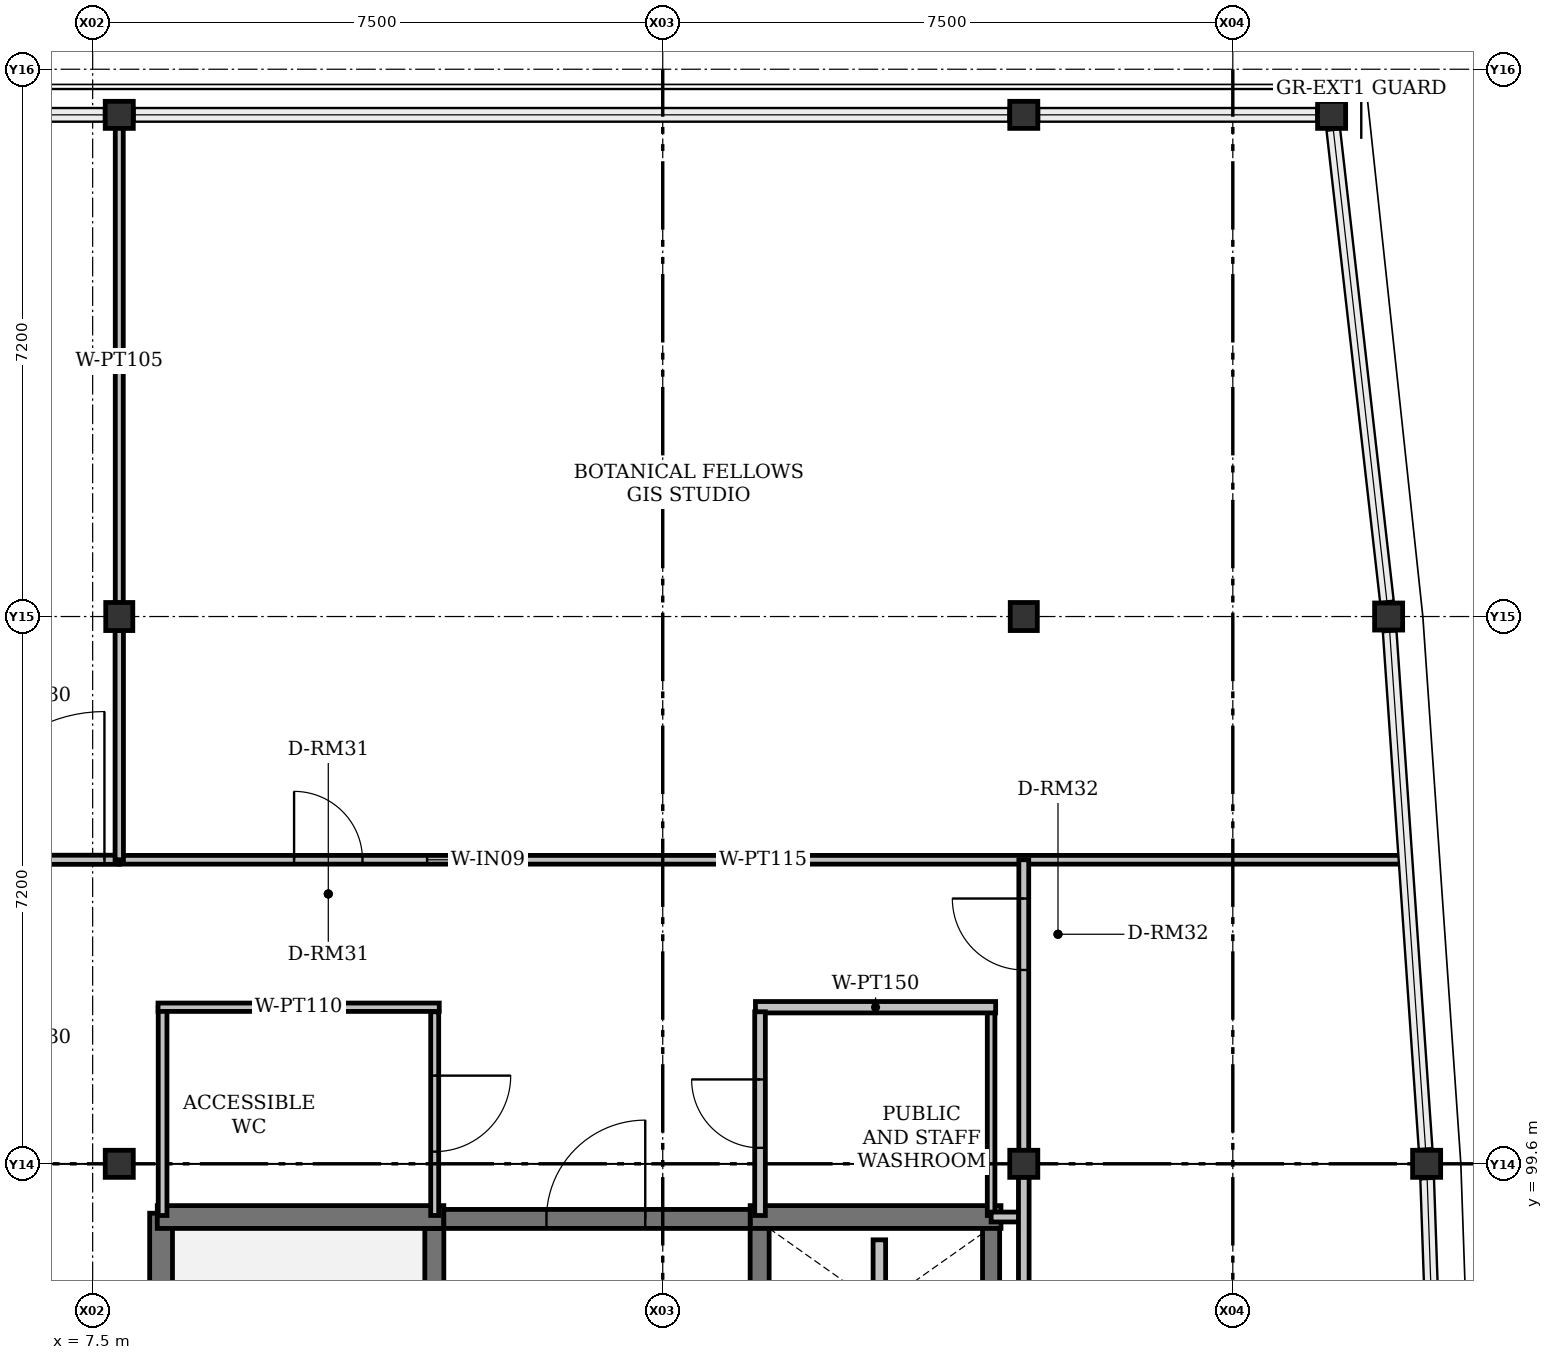
"""IFC4 building model, lengths in metres.
Left out: names, types, materials, properties, quantities, classifications, styles, units other than length and angle.
Written with IfcOpenShell. Run it as: python <this file> out.ifc"""

import sys

from ifc_helpers import new_model, si_unit, direction, frame, frame_2d, origin, origin_2d, place, context, subcontext, project, spatial, rectangle, i_section, extrude, element, fill, save


model = new_model("IFC4")
c1 = context("Model", 3, precision=1e-05, world=origin(), true_north=direction((0.0, 1.0)))
c2 = subcontext(c1, "Body", "Model", "MODEL_VIEW")
j1 = project(units=[si_unit("LENGTHUNIT", "METRE"), si_unit("PLANEANGLEUNIT", "RADIAN")], contexts=[c1])
p1 = place(None, origin())
s1 = spatial("IfcSite", under=j1, at=p1, CompositionType="ELEMENT")
p2 = place(p1, origin())
s2 = spatial("IfcBuilding", under=s1, at=p2, CompositionType="ELEMENT")
p3 = place(p2, frame((0.0, 0.0, 51.9)))
s3 = spatial("IfcBuildingStorey", under=s2, at=p3, CompositionType="ELEMENT", Elevation=51.9)
for number, where, z_axis, x_axis in (
    (1, (7.85, 99.6, 0.0), (0.0, 0.0, 1.0), (1.0, 0.0, 0.0)),
    (2, (19.75, 99.6, 0.0), (0.0, 0.0, 1.0), (1.0, 0.0, 0.0)),
    (3, (25.05, 99.6, 0.0), (0.0, 0.0, 1.0), (1.0, 0.0, 0.0)),
    (4, (7.85, 106.8, 0.0), (0.0, 0.0, 1.0), (0.0, 1.0, 0.0)),
    (5, (19.75, 106.8, 0.0), (0.0, 0.0, 1.0), (0.0, 1.0, 0.0)),
    (6, (24.55, 106.8, 0.0), (0.0, 0.0, 1.0), (1.0, 0.0, 0.0)),
    (7, (7.85, 113.4, 0.0), (0.0, 0.0, 1.0), (1.0, 0.0, 0.0)),
    (8, (19.75, 113.4, 0.0), (0.0, 0.0, 1.0), (1.0, 0.0, 0.0)),
    (9, (23.8, 113.4, 0.0), (0.0, 0.0, 1.0), (1.0, 0.0, 0.0)),
):
    element("IfcColumn", number, at=place(p3, frame(where, z_axis=z_axis, x_axis=x_axis)), inside=s3, PredefinedType="COLUMN", context=c2, shape_type="SweptSolid", body=[
        extrude(i_section(OverallWidth=0.369, OverallDepth=0.356, WebThickness=0.011, FlangeThickness=0.018, FilletRadius=0.015, at=origin_2d()), origin(), (0.0, 0.0, 1.0), 4.2),
    ])
p4 = place(p3, frame((8.4, 90.775, 0.0), z_axis=(0.0, 0.0, 1.0), x_axis=(0.0, 1.0, 0.0)))
e10 = element("IfcWall", 10, at=p4, inside=s3, PredefinedType="SHEAR", context=c2, shape_type="SweptSolid", body=[
    extrude(rectangle(XDim=8.175, YDim=0.3, at=frame_2d((4.087, 0.0))), origin(), (0.0, 0.0, 1.0), 4.2),
])
p5 = place(p3, frame((11.995, 90.9, 0.0), z_axis=(0.0, 0.0, 1.0), x_axis=(0.0, 1.0, 0.0)))
e11 = element("IfcWall", 11, at=p5, inside=s3, PredefinedType="SHEAR", context=c2, shape_type="SweptSolid", body=[
    extrude(rectangle(XDim=7.85, YDim=0.25, at=frame_2d((3.925, 0.0))), origin(), (0.0, 0.0, 1.0), 4.2),
])
p6 = place(p3, frame((8.35, 98.9, 0.0), z_axis=(0.0, 0.0, 1.0), x_axis=(1.0, 0.0, 0.0)))
e12 = element("IfcWall", 12, at=p6, inside=s3, PredefinedType="SHEAR", context=c2, shape_type="SweptSolid", body=[
    extrude(rectangle(XDim=3.77, YDim=0.3, at=frame_2d((1.885, 0.0))), origin(), (0.0, 0.0, 1.0), 4.2),
])
p7 = place(p3, frame((16.15, 98.9, 0.0), z_axis=(0.0, 0.0, 1.0), x_axis=(1.0, 0.0, 0.0)))
e13 = element("IfcWall", 13, at=p7, inside=s3, PredefinedType="SHEAR", context=c2, shape_type="SweptSolid", body=[
    extrude(rectangle(XDim=3.3, YDim=0.3, at=frame_2d((1.65, 0.0))), origin(), (0.0, 0.0, 1.0), 4.2),
])
p8 = place(p3, frame((12.12, 98.875, 0.0), z_axis=(0.0, 0.0, 1.0), x_axis=(1.0, 0.0, 0.0)))
e14 = element("IfcWall", 14, at=p8, inside=s3, PredefinedType="SHEAR", context=c2, shape_type="SweptSolid", body=[
    extrude(rectangle(XDim=4.03, YDim=0.25, at=frame_2d((2.015, 0.0))), origin(), (0.0, 0.0, 1.0), 4.2),
])
p9 = place(p8, frame((1.35, 0.0, 0.0)))
e15 = element("IfcOpeningElement", 15, at=p9, cuts=e14, PredefinedType="OPENING", context=c2, shape_type="SweptSolid", body=[
    extrude(rectangle(XDim=1.3, YDim=2.2, at=frame_2d((0.65, 1.1))), frame((0.0, 0.125, 0.0), z_axis=(0.0, -1.0, 0.0), x_axis=(1.0, 0.0, 0.0)), (0.0, 0.0, 1.0), 0.25),
])
p10 = place(p3, frame((19.32, 84.8, 0.0), z_axis=(0.0, 0.0, 1.0), x_axis=(0.0, 1.0, 0.0)))
e16 = element("IfcWall", 16, at=p10, inside=s3, PredefinedType="SHEAR", context=c2, shape_type="SweptSolid", body=[
    extrude(rectangle(XDim=13.95, YDim=0.225, at=frame_2d((6.975, 0.0))), origin(), (0.0, 0.0, 1.0), 4.2),
])
p11 = place(p3, frame((16.275, 96.575, 0.0), z_axis=(0.0, 0.0, 1.0), x_axis=(0.0, 1.0, 0.0)))
e17 = element("IfcWall", 17, at=p11, inside=s3, PredefinedType="SHEAR", context=c2, shape_type="SweptSolid", body=[
    extrude(rectangle(XDim=2.175, YDim=0.25, at=frame_2d((1.087, 0.0))), origin(), (0.0, 0.0, 1.0), 4.2),
])
p12 = place(p3, frame((17.85, 96.8, 0.0), z_axis=(0.0, 0.0, 1.0), x_axis=(0.0, 1.0, 0.0)))
e18 = element("IfcWall", 18, at=p12, inside=s3, PredefinedType="PLUMBINGWALL", context=c2, shape_type="SweptSolid", body=[
    extrude(rectangle(XDim=1.8, YDim=0.165, at=frame_2d((0.9, 0.0))), origin(), (0.0, 0.0, 1.0), 4.2),
])
p13 = place(p3, frame((8.42, 98.92, 0.0), z_axis=(0.0, 0.0, 1.0), x_axis=(0.0, 1.0, 0.0)))
e19 = element("IfcWall", 19, at=p13, inside=s3, PredefinedType="PARTITIONING", context=c2, shape_type="SweptSolid", body=[
    extrude(rectangle(XDim=2.74, YDim=0.115, at=frame_2d((1.37, 0.0))), origin(), (0.0, 0.0, 1.0), 3.451),
])
p14 = place(p3, frame((8.36, 101.66, 0.0), z_axis=(0.0, 0.0, 1.0), x_axis=(1.0, 0.0, 0.0)))
e20 = element("IfcWall", 20, at=p14, inside=s3, PredefinedType="PARTITIONING", context=c2, shape_type="SweptSolid", body=[
    extrude(rectangle(XDim=3.7, YDim=0.11, at=frame_2d((1.85, 0.0))), origin(), (0.0, 0.0, 1.0), 3.95),
])
p15 = place(p3, frame((12.0, 101.6, 0.0), z_axis=(0.0, 0.0, 1.0), x_axis=(0.0, -1.0, 0.0)))
e21 = element("IfcWall", 21, at=p15, inside=s3, PredefinedType="PARTITIONING", context=c2, shape_type="SweptSolid", body=[
    extrude(rectangle(XDim=2.68, YDim=0.105, at=frame_2d((1.34, 0.0))), origin(), (0.0, 0.0, 1.0), 3.451),
])
p16 = place(p15, frame((0.84, 0.0, 0.0)))
e22 = element("IfcOpeningElement", 22, at=p16, cuts=e21, PredefinedType="OPENING", context=c2, shape_type="SweptSolid", body=[
    extrude(rectangle(XDim=1.0, YDim=2.25, at=frame_2d((0.5, 1.125))), frame((0.0, 0.052, 0.0), z_axis=(0.0, -1.0, 0.0), x_axis=(1.0, 0.0, 0.0)), (0.0, 0.0, 1.0), 0.105),
])
p17 = place(p3, frame((19.32, 98.92, 0.0), z_axis=(0.0, 0.0, 1.0), x_axis=(0.0, 1.0, 0.0)))
e23 = element("IfcWall", 23, at=p17, inside=s3, PredefinedType="PARTITIONING", context=c2, shape_type="SweptSolid", body=[
    extrude(rectangle(XDim=2.74, YDim=0.1, at=frame_2d((1.37, 0.0))), origin(), (0.0, 0.0, 1.0), 3.451),
])
p18 = place(p3, frame((19.38, 101.66, 0.0), z_axis=(0.0, 0.0, 1.0), x_axis=(-1.0, 0.0, 0.0)))
e24 = element("IfcWall", 24, at=p18, inside=s3, PredefinedType="PARTITIONING", context=c2, shape_type="SweptSolid", body=[
    extrude(rectangle(XDim=3.16, YDim=0.15, at=frame_2d((1.58, 0.0))), origin(), (0.0, 0.0, 1.0), 3.95),
])
p19 = place(p3, frame((16.28, 98.92, 0.0), z_axis=(0.0, 0.0, 1.0), x_axis=(0.0, 1.0, 0.0)))
e25 = element("IfcWall", 25, at=p19, inside=s3, PredefinedType="PARTITIONING", context=c2, shape_type="SweptSolid", body=[
    extrude(rectangle(XDim=2.68, YDim=0.14, at=frame_2d((1.34, 0.0))), origin(), (0.0, 0.0, 1.0), 3.451),
])
p20 = place(p19, frame((0.89, 0.0, 0.0)))
e26 = element("IfcOpeningElement", 26, at=p20, cuts=e25, PredefinedType="OPENING", context=c2, shape_type="SweptSolid", body=[
    extrude(rectangle(XDim=0.9, YDim=2.08, at=frame_2d((0.45, 1.04))), frame((0.0, 0.07, 0.0), z_axis=(0.0, -1.0, 0.0), x_axis=(1.0, 0.0, 0.0)), (0.0, 0.0, 1.0), 0.14),
])
p21 = place(p3, frame((19.75, 98.9, 0.0), z_axis=(0.0, 0.0, 1.0), x_axis=(-1.0, 0.0, 0.0)))
e27 = element("IfcWall", 27, at=p21, inside=s3, PredefinedType="PARTITIONING", context=c2, shape_type="SweptSolid", body=[
    extrude(rectangle(XDim=0.43, YDim=0.13, at=frame_2d((0.215, 0.0))), origin(), (0.0, 0.0, 1.0), 3.527),
])
p22 = place(p3, frame((0.65, 103.6, 0.0), z_axis=(0.0, 0.0, 1.0), x_axis=(1.0, 0.0, 0.0)))
e28 = element("IfcWall", 28, at=p22, inside=s3, PredefinedType="PARTITIONING", context=c2, shape_type="SweptSolid", body=[
    extrude(rectangle(XDim=7.2, YDim=0.12, at=frame_2d((3.6, 0.0))), origin(), (0.0, 0.0, 1.0), 3.527),
])
p23 = place(p22, frame((5.055, 0.0, 0.0)))
e29 = element("IfcOpeningElement", 29, at=p23, cuts=e28, PredefinedType="OPENING", context=c2, shape_type="SweptSolid", body=[
    extrude(rectangle(XDim=1.95, YDim=2.4, at=frame_2d((0.975, 1.2))), frame((0.0, 0.06, 0.0), z_axis=(0.0, -1.0, 0.0), x_axis=(1.0, 0.0, 0.0)), (0.0, 0.0, 1.0), 0.12),
])
p24 = place(p3, frame((7.85, 103.6, 0.0), z_axis=(0.0, 0.0, 1.0), x_axis=(1.0, 0.0, 0.0)))
e30 = element("IfcWall", 30, at=p24, inside=s3, PredefinedType="PARTITIONING", context=c2, shape_type="SweptSolid", body=[
    extrude(rectangle(XDim=16.94, YDim=0.115, at=frame_2d((8.47, 0.0))), origin(), (0.0, 0.0, 1.0), 3.527),
])
p25 = place(p24, frame((2.3, 0.0, 0.0)))
e31 = element("IfcOpeningElement", 31, at=p25, cuts=e30, PredefinedType="OPENING", context=c2, shape_type="SweptSolid", body=[
    extrude(rectangle(XDim=0.9, YDim=2.08, at=frame_2d((0.45, 1.04))), frame((0.0, 0.058, 0.0), z_axis=(0.0, -1.0, 0.0), x_axis=(1.0, 0.0, 0.0)), (0.0, 0.0, 1.0), 0.115),
])
p26 = place(p24, frame((4.05, 0.0, 0.92)))
e32 = element("IfcOpeningElement", 32, at=p26, cuts=e30, PredefinedType="OPENING", context=c2, shape_type="SweptSolid", body=[
    extrude(rectangle(XDim=1.0, YDim=1.3, at=frame_2d((0.5, 0.65))), frame((0.0, 0.058, 0.0), z_axis=(0.0, -1.0, 0.0), x_axis=(1.0, 0.0, 0.0)), (0.0, 0.0, 1.0), 0.115),
])
p27 = place(p3, frame((7.85, 106.621, 0.0), z_axis=(0.0, 0.0, 1.0), x_axis=(0.0, -1.0, 0.0)))
e33 = element("IfcWall", 33, at=p27, inside=s3, PredefinedType="PARTITIONING", context=c2, shape_type="SweptSolid", body=[
    extrude(rectangle(XDim=3.021, YDim=0.11, at=frame_2d((1.51, 0.0))), origin(), (0.0, 0.0, 1.0), 3.527),
])
p28 = place(p3, frame((7.85, 113.35, 0.0), z_axis=(0.0, 0.0, 1.0), x_axis=(0.0, -1.0, 0.0)))
e34 = element("IfcWall", 34, at=p28, inside=s3, PredefinedType="PARTITIONING", context=c2, shape_type="SweptSolid", body=[
    extrude(rectangle(XDim=6.371, YDim=0.105, at=frame_2d((3.185, 0.0))), origin(), (0.0, 0.0, 1.0), 3.527),
])
p29 = place(p3, frame((19.75, 92.58, 0.0), z_axis=(0.0, 0.0, 1.0), x_axis=(0.0, 1.0, 0.0)))
e35 = element("IfcWall", 35, at=p29, inside=s3, PredefinedType="PARTITIONING", context=c2, shape_type="SweptSolid", body=[
    extrude(rectangle(XDim=6.847, YDim=0.14, at=frame_2d((3.424, 0.0))), origin(), (0.0, 0.0, 1.0), 3.527),
])
p30 = place(p3, frame((19.75, 99.773, 0.0), z_axis=(0.0, 0.0, 1.0), x_axis=(0.0, 1.0, 0.0)))
e36 = element("IfcWall", 36, at=p30, inside=s3, PredefinedType="PARTITIONING", context=c2, shape_type="SweptSolid", body=[
    extrude(rectangle(XDim=3.827, YDim=0.13, at=frame_2d((1.914, 0.0))), origin(), (0.0, 0.0, 1.0), 3.527),
])
p31 = place(p30, frame((2.377, 0.0, 0.0)))
e37 = element("IfcOpeningElement", 37, at=p31, cuts=e36, PredefinedType="OPENING", context=c2, shape_type="SweptSolid", body=[
    extrude(rectangle(XDim=0.94, YDim=2.08, at=frame_2d((0.47, 1.04))), frame((0.0, 0.065, 0.0), z_axis=(0.0, -1.0, 0.0), x_axis=(1.0, 0.0, 0.0)), (0.0, 0.0, 1.0), 0.13),
])
p32 = place(p9, origin())
e38 = element("IfcDoor", 38, at=p32, inside=s3, OperationType="SINGLE_SWING_RIGHT", PredefinedType="DOOR", context=c2, shape_type="SweptSolid", body=[
    extrude(rectangle(XDim=1.3, YDim=2.2, at=frame_2d((0.65, 1.1))), frame((0.0, 0.025, 0.0), z_axis=(0.0, -1.0, 0.0), x_axis=(1.0, 0.0, 0.0)), (0.0, 0.0, 1.0), 0.05),
])
fill(e15, e38)
p33 = place(p16, origin())
e39 = element("IfcDoor", 39, at=p33, inside=s3, OperationType="SINGLE_SWING_LEFT", PredefinedType="DOOR", context=c2, shape_type="SweptSolid", body=[
    extrude(rectangle(XDim=1.0, YDim=2.25, at=frame_2d((0.5, 1.125))), frame((0.0, 0.025, 0.0), z_axis=(0.0, -1.0, 0.0), x_axis=(1.0, 0.0, 0.0)), (0.0, 0.0, 1.0), 0.05),
])
fill(e22, e39)
p34 = place(p20, origin())
e40 = element("IfcDoor", 40, at=p34, inside=s3, OperationType="SINGLE_SWING_RIGHT", PredefinedType="DOOR", context=c2, shape_type="SweptSolid", body=[
    extrude(rectangle(XDim=0.9, YDim=2.08, at=frame_2d((0.45, 1.04))), frame((0.0, 0.025, 0.0), z_axis=(0.0, -1.0, 0.0), x_axis=(1.0, 0.0, 0.0)), (0.0, 0.0, 1.0), 0.05),
])
fill(e26, e40)
p35 = place(p23, origin())
e41 = element("IfcDoor", 41, at=p35, inside=s3, OperationType="SINGLE_SWING_RIGHT", PredefinedType="DOOR", context=c2, shape_type="SweptSolid", body=[
    extrude(rectangle(XDim=1.95, YDim=2.4, at=frame_2d((0.975, 1.2))), frame((0.0, 0.025, 0.0), z_axis=(0.0, -1.0, 0.0), x_axis=(1.0, 0.0, 0.0)), (0.0, 0.0, 1.0), 0.05),
])
fill(e29, e41)
p36 = place(p25, origin())
e42 = element("IfcDoor", 42, at=p36, inside=s3, OperationType="SINGLE_SWING_LEFT", PredefinedType="DOOR", context=c2, shape_type="SweptSolid", body=[
    extrude(rectangle(XDim=0.9, YDim=2.08, at=frame_2d((0.45, 1.04))), frame((0.0, 0.025, 0.0), z_axis=(0.0, -1.0, 0.0), x_axis=(1.0, 0.0, 0.0)), (0.0, 0.0, 1.0), 0.05),
])
fill(e31, e42)
p37 = place(p26, origin())
e43 = element("IfcWindow", 43, at=p37, inside=s3, PartitioningType="SINGLE_PANEL", PredefinedType="WINDOW", context=c2, shape_type="SweptSolid", body=[
    extrude(rectangle(XDim=1.0, YDim=1.3, at=frame_2d((0.5, 0.65))), frame((0.0, 0.03, 0.0), z_axis=(0.0, -1.0, 0.0), x_axis=(1.0, 0.0, 0.0)), (0.0, 0.0, 1.0), 0.06),
])
fill(e32, e43)
p38 = place(p31, origin())
e44 = element("IfcDoor", 44, at=p38, inside=s3, OperationType="SINGLE_SWING_RIGHT", PredefinedType="DOOR", context=c2, shape_type="SweptSolid", body=[
    extrude(rectangle(XDim=0.94, YDim=2.08, at=frame_2d((0.47, 1.04))), frame((0.0, 0.025, 0.0), z_axis=(0.0, -1.0, 0.0), x_axis=(1.0, 0.0, 0.0)), (0.0, 0.0, 1.0), 0.05),
])
fill(e37, e44)
save(model, sys.argv[1])
